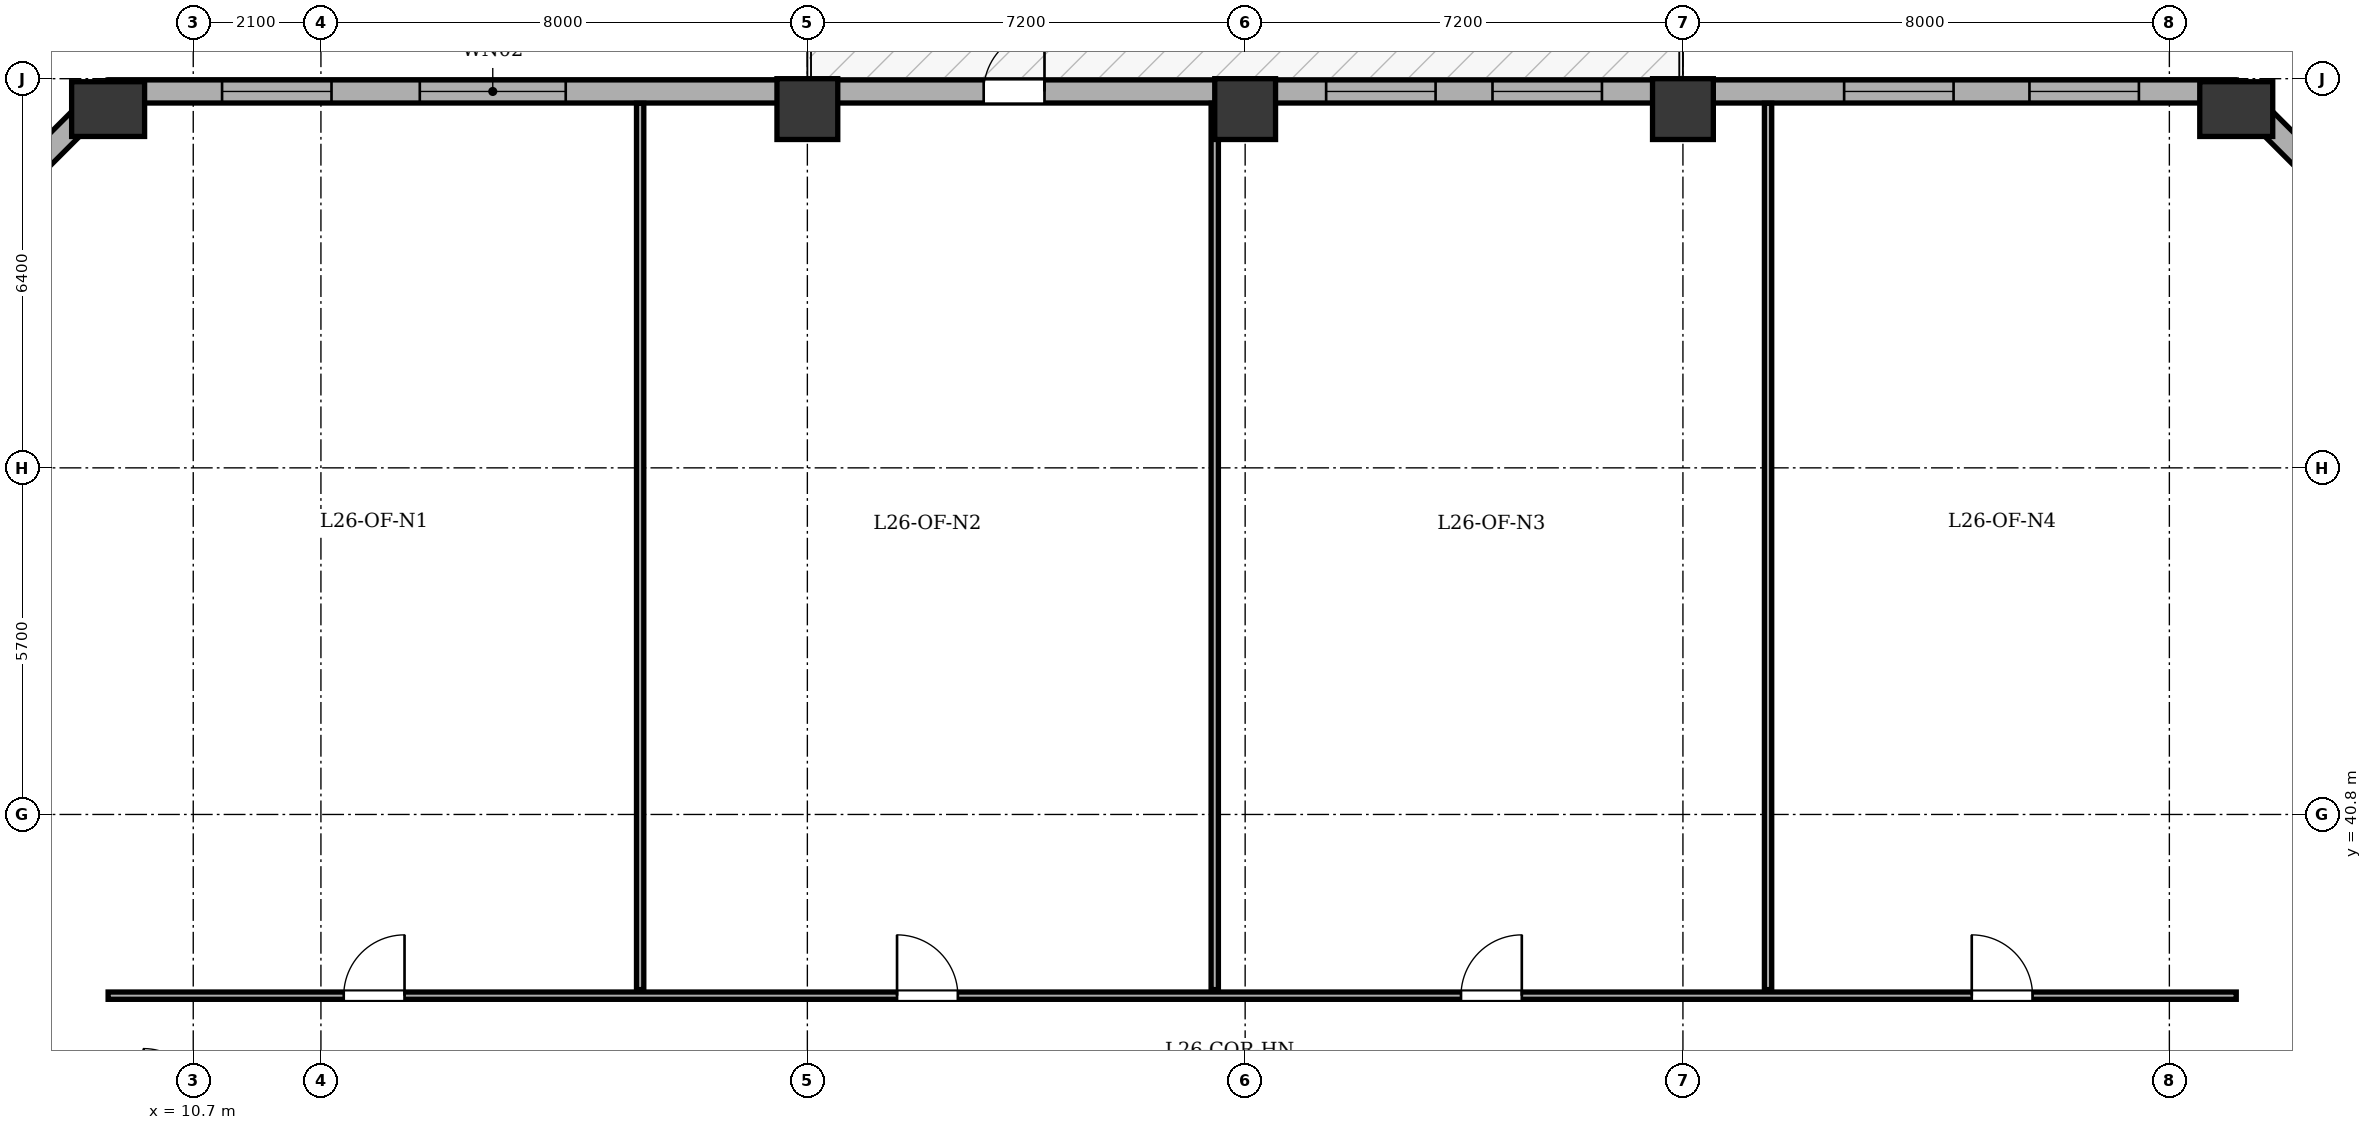
"""IFC4 building model, lengths in metres.
Left out: names, types, materials, properties, quantities, classifications, styles, units other than length and angle.
Written with IfcOpenShell. Run it as: python <this file> out.ifc"""

import sys

from ifc_helpers import new_model, si_unit, direction, frame, frame_2d, origin, origin_2d, place, context, subcontext, project, spatial, rectangle, extrude, element, fill, save


model = new_model("IFC4")
c1 = context("Model", 3, precision=1e-05, world=origin(), true_north=direction((0.0, 1.0)))
c2 = subcontext(c1, "Body", "Model", "MODEL_VIEW")
j1 = project(units=[si_unit("LENGTHUNIT", "METRE"), si_unit("PLANEANGLEUNIT", "RADIAN")], contexts=[c1])
p1 = place(None, origin())
s1 = spatial("IfcSite", under=j1, at=p1, CompositionType="ELEMENT")
p2 = place(p1, origin())
s2 = spatial("IfcBuilding", under=s1, at=p2, CompositionType="ELEMENT")
p3 = place(p2, frame((0.0, 0.0, 106.2)))
s3 = spatial("IfcBuildingStorey", under=s2, at=p3, CompositionType="ELEMENT", Elevation=106.2)
p4 = place(p3, frame((9.3, 52.4, 0.0), z_axis=(0.0, 0.0, 1.0), x_axis=(1.0, 0.0, 0.0)))
e1 = element("IfcColumn", 1, at=p4, inside=s3, PredefinedType="COLUMN", context=c2, shape_type="SweptSolid", body=[
    extrude(rectangle(XDim=0.9, YDim=1.2, at=origin_2d()), origin(), (0.0, 0.0, 1.0), 3.9),
])
for number, where, z_axis, x_axis in (
    (2, (20.8, 52.4, 0.0), (0.0, 0.0, 1.0), (1.0, 0.0, 0.0)),
    (3, (28.0, 52.4, 0.0), (0.0, 0.0, 1.0), (1.0, 0.0, 0.0)),
    (4, (35.2, 52.4, 0.0), (0.0, 0.0, 1.0), (1.0, 0.0, 0.0)),
):
    element("IfcColumn", number, at=place(p3, frame(where, z_axis=z_axis, x_axis=x_axis)), inside=s3, PredefinedType="COLUMN", context=c2, shape_type="SweptSolid", body=[
        extrude(rectangle(XDim=1.0, YDim=1.0, at=origin_2d()), origin(), (0.0, 0.0, 1.0), 3.9),
    ])
p5 = place(p3, frame((44.3, 52.4, 0.0), z_axis=(0.0, 0.0, 1.0), x_axis=(1.0, 0.0, 0.0)))
e5 = element("IfcColumn", 5, at=p5, inside=s3, PredefinedType="COLUMN", context=c2, shape_type="SweptSolid", body=[
    extrude(rectangle(XDim=0.9, YDim=1.2, at=origin_2d()), origin(), (0.0, 0.0, 1.0), 3.9),
])
p6 = place(p3, frame((4.51, 47.9, 0.0), z_axis=(0.0, 0.0, 1.0), x_axis=(0.707106781187, 0.707106781187, 0.0)))
e6 = element("IfcWall", 6, at=p6, inside=s3, PredefinedType="STANDARD", context=c2, shape_type="SweptSolid", body=[
    extrude(rectangle(XDim=6.774, YDim=0.38, at=frame_2d((3.387, 0.0))), origin(), (0.0, 0.0, 1.0), 2.985),
])
p7 = place(p6, frame((2.687, 0.0, 0.8)))
e7 = element("IfcOpeningElement", 7, at=p7, cuts=e6, PredefinedType="OPENING", context=c2, shape_type="SweptSolid", body=[
    extrude(rectangle(XDim=1.4, YDim=1.65, at=frame_2d((0.7, 0.825))), frame((0.0, 0.2, 0.0), z_axis=(0.0, -1.0, 0.0), x_axis=(1.0, 0.0, 0.0)), (0.0, 0.0, 1.0), 0.4),
])
p8 = place(p3, frame((9.3, 52.69, 0.0), z_axis=(0.0, 0.0, 1.0), x_axis=(1.0, 0.0, 0.0)))
e8 = element("IfcWall", 8, at=p8, inside=s3, PredefinedType="STANDARD", context=c2, shape_type="SweptSolid", body=[
    extrude(rectangle(XDim=35.0, YDim=0.38, at=frame_2d((17.5, 0.0))), origin(), (0.0, 0.0, 1.0), 2.985),
])
p9 = place(p8, frame((14.4, 0.0, 0.0)))
e9 = element("IfcOpeningElement", 9, at=p9, cuts=e8, PredefinedType="OPENING", context=c2, shape_type="SweptSolid", body=[
    extrude(rectangle(XDim=1.0, YDim=2.02, at=frame_2d((0.5, 1.01))), frame((0.0, 0.2, 0.0), z_axis=(0.0, -1.0, 0.0), x_axis=(1.0, 0.0, 0.0)), (0.0, 0.0, 1.0), 0.4),
])
p10 = place(p8, frame((1.874, 0.0, 0.8)))
e10 = element("IfcOpeningElement", 10, at=p10, cuts=e8, PredefinedType="OPENING", context=c2, shape_type="SweptSolid", body=[
    extrude(rectangle(XDim=1.8, YDim=1.9, at=frame_2d((0.9, 0.95))), frame((0.0, 0.2, 0.0), z_axis=(0.0, -1.0, 0.0), x_axis=(1.0, 0.0, 0.0)), (0.0, 0.0, 1.0), 0.4),
])
p11 = place(p8, frame((5.126, 0.0, 0.8)))
e11 = element("IfcOpeningElement", 11, at=p11, cuts=e8, PredefinedType="OPENING", context=c2, shape_type="SweptSolid", body=[
    extrude(rectangle(XDim=2.4, YDim=1.9, at=frame_2d((1.2, 0.95))), frame((0.0, 0.2, 0.0), z_axis=(0.0, -1.0, 0.0), x_axis=(1.0, 0.0, 0.0)), (0.0, 0.0, 1.0), 0.4),
])
p12 = place(p8, frame((20.032, 0.0, 0.8)))
e12 = element("IfcOpeningElement", 12, at=p12, cuts=e8, PredefinedType="OPENING", context=c2, shape_type="SweptSolid", body=[
    extrude(rectangle(XDim=1.8, YDim=1.9, at=frame_2d((0.9, 0.95))), frame((0.0, 0.2, 0.0), z_axis=(0.0, -1.0, 0.0), x_axis=(1.0, 0.0, 0.0)), (0.0, 0.0, 1.0), 0.4),
])
p13 = place(p8, frame((22.768, 0.0, 0.8)))
e13 = element("IfcOpeningElement", 13, at=p13, cuts=e8, PredefinedType="OPENING", context=c2, shape_type="SweptSolid", body=[
    extrude(rectangle(XDim=1.8, YDim=1.9, at=frame_2d((0.9, 0.95))), frame((0.0, 0.2, 0.0), z_axis=(0.0, -1.0, 0.0), x_axis=(1.0, 0.0, 0.0)), (0.0, 0.0, 1.0), 0.4),
])
p14 = place(p8, frame((28.551, 0.0, 0.8)))
e14 = element("IfcOpeningElement", 14, at=p14, cuts=e8, PredefinedType="OPENING", context=c2, shape_type="SweptSolid", body=[
    extrude(rectangle(XDim=1.8, YDim=1.9, at=frame_2d((0.9, 0.95))), frame((0.0, 0.2, 0.0), z_axis=(0.0, -1.0, 0.0), x_axis=(1.0, 0.0, 0.0)), (0.0, 0.0, 1.0), 0.4),
])
p15 = place(p8, frame((31.599, 0.0, 0.8)))
e15 = element("IfcOpeningElement", 15, at=p15, cuts=e8, PredefinedType="OPENING", context=c2, shape_type="SweptSolid", body=[
    extrude(rectangle(XDim=1.8, YDim=1.9, at=frame_2d((0.9, 0.95))), frame((0.0, 0.2, 0.0), z_axis=(0.0, -1.0, 0.0), x_axis=(1.0, 0.0, 0.0)), (0.0, 0.0, 1.0), 0.4),
])
p16 = place(p3, frame((44.3, 52.69, 0.0), z_axis=(0.0, 0.0, 1.0), x_axis=(0.707106781187, -0.707106781187, 0.0)))
e16 = element("IfcWall", 16, at=p16, inside=s3, PredefinedType="STANDARD", context=c2, shape_type="SweptSolid", body=[
    extrude(rectangle(XDim=6.774, YDim=0.38, at=frame_2d((3.387, 0.0))), origin(), (0.0, 0.0, 1.0), 2.985),
])
p17 = place(p16, frame((2.687, 0.0, 0.8)))
e17 = element("IfcOpeningElement", 17, at=p17, cuts=e16, PredefinedType="OPENING", context=c2, shape_type="SweptSolid", body=[
    extrude(rectangle(XDim=1.4, YDim=1.65, at=frame_2d((0.7, 0.825))), frame((0.0, 0.2, 0.0), z_axis=(0.0, -1.0, 0.0), x_axis=(1.0, 0.0, 0.0)), (0.0, 0.0, 1.0), 0.4),
])
p18 = place(p3, frame((9.3, 37.82, 0.0), z_axis=(0.0, 0.0, 1.0), x_axis=(1.0, 0.0, 0.0)))
e18 = element("IfcWall", 18, at=p18, inside=s3, PredefinedType="PARTITIONING", context=c2, shape_type="SweptSolid", body=[
    extrude(rectangle(XDim=35.0, YDim=0.12, at=frame_2d((17.5, 0.0))), origin(), (0.0, 0.0, 1.0), 3.45),
])
p19 = place(p18, frame((3.875, 0.0, 0.0)))
e19 = element("IfcOpeningElement", 19, at=p19, cuts=e18, PredefinedType="OPENING", context=c2, shape_type="SweptSolid", body=[
    extrude(rectangle(XDim=1.0, YDim=2.1, at=frame_2d((0.5, 1.05))), frame((0.0, 0.07, 0.0), z_axis=(0.0, -1.0, 0.0), x_axis=(1.0, 0.0, 0.0)), (0.0, 0.0, 1.0), 0.14),
])
p20 = place(p18, frame((12.975, 0.0, 0.0)))
e20 = element("IfcOpeningElement", 20, at=p20, cuts=e18, PredefinedType="OPENING", context=c2, shape_type="SweptSolid", body=[
    extrude(rectangle(XDim=1.0, YDim=2.1, at=frame_2d((0.5, 1.05))), frame((0.0, 0.07, 0.0), z_axis=(0.0, -1.0, 0.0), x_axis=(1.0, 0.0, 0.0)), (0.0, 0.0, 1.0), 0.14),
])
p21 = place(p18, frame((22.25, 0.0, 0.0)))
e21 = element("IfcOpeningElement", 21, at=p21, cuts=e18, PredefinedType="OPENING", context=c2, shape_type="SweptSolid", body=[
    extrude(rectangle(XDim=1.0, YDim=2.1, at=frame_2d((0.5, 1.05))), frame((0.0, 0.07, 0.0), z_axis=(0.0, -1.0, 0.0), x_axis=(1.0, 0.0, 0.0)), (0.0, 0.0, 1.0), 0.14),
])
p22 = place(p18, frame((30.65, 0.0, 0.0)))
e22 = element("IfcOpeningElement", 22, at=p22, cuts=e18, PredefinedType="OPENING", context=c2, shape_type="SweptSolid", body=[
    extrude(rectangle(XDim=1.0, YDim=2.1, at=frame_2d((0.5, 1.05))), frame((0.0, 0.07, 0.0), z_axis=(0.0, -1.0, 0.0), x_axis=(1.0, 0.0, 0.0)), (0.0, 0.0, 1.0), 0.14),
])
for number, where, z_axis, x_axis in (
    (23, (18.05, 37.92, 0.0), (0.0, 0.0, 1.0), (0.0, 1.0, 0.0)),
    (24, (27.5, 37.92, 0.0), (0.0, 0.0, 1.0), (0.0, 1.0, 0.0)),
    (25, (36.6, 37.92, 0.0), (0.0, 0.0, 1.0), (0.0, 1.0, 0.0)),
):
    element("IfcWall", number, at=place(p3, frame(where, z_axis=z_axis, x_axis=x_axis)), inside=s3, PredefinedType="PARTITIONING", context=c2, shape_type="SweptSolid", body=[
        extrude(rectangle(XDim=14.575, YDim=0.12, at=frame_2d((7.288, 0.0))), origin(), (0.0, 0.0, 1.0), 3.45),
    ])
p23 = place(p9, origin())
e26 = element("IfcDoor", 26, at=p23, inside=s3, OperationType="SINGLE_SWING_RIGHT", PredefinedType="DOOR", context=c2, shape_type="SweptSolid", body=[
    extrude(rectangle(XDim=1.0, YDim=2.02, at=frame_2d((0.5, 1.01))), frame((0.0, 0.025, 0.0), z_axis=(0.0, -1.0, 0.0), x_axis=(1.0, 0.0, 0.0)), (0.0, 0.0, 1.0), 0.05),
])
fill(e9, e26)
p24 = place(p10, origin())
e27 = element("IfcWindow", 27, at=p24, inside=s3, PartitioningType="SINGLE_PANEL", PredefinedType="WINDOW", context=c2, shape_type="SweptSolid", body=[
    extrude(rectangle(XDim=1.8, YDim=1.9, at=frame_2d((0.9, 0.95))), frame((0.0, -0.01, 0.0), z_axis=(0.0, -1.0, 0.0), x_axis=(1.0, 0.0, 0.0)), (0.0, 0.0, 1.0), 0.06),
])
fill(e10, e27)
p25 = place(p11, origin())
e28 = element("IfcWindow", 28, at=p25, inside=s3, PartitioningType="SINGLE_PANEL", PredefinedType="WINDOW", context=c2, shape_type="SweptSolid", body=[
    extrude(rectangle(XDim=2.4, YDim=1.9, at=frame_2d((1.2, 0.95))), frame((0.0, -0.01, 0.0), z_axis=(0.0, -1.0, 0.0), x_axis=(1.0, 0.0, 0.0)), (0.0, 0.0, 1.0), 0.06),
])
fill(e11, e28)
p26 = place(p12, origin())
e29 = element("IfcWindow", 29, at=p26, inside=s3, PartitioningType="SINGLE_PANEL", PredefinedType="WINDOW", context=c2, shape_type="SweptSolid", body=[
    extrude(rectangle(XDim=1.8, YDim=1.9, at=frame_2d((0.9, 0.95))), frame((0.0, -0.01, 0.0), z_axis=(0.0, -1.0, 0.0), x_axis=(1.0, 0.0, 0.0)), (0.0, 0.0, 1.0), 0.06),
])
fill(e12, e29)
p27 = place(p13, origin())
e30 = element("IfcWindow", 30, at=p27, inside=s3, PartitioningType="SINGLE_PANEL", PredefinedType="WINDOW", context=c2, shape_type="SweptSolid", body=[
    extrude(rectangle(XDim=1.8, YDim=1.9, at=frame_2d((0.9, 0.95))), frame((0.0, -0.01, 0.0), z_axis=(0.0, -1.0, 0.0), x_axis=(1.0, 0.0, 0.0)), (0.0, 0.0, 1.0), 0.06),
])
fill(e13, e30)
p28 = place(p14, origin())
e31 = element("IfcWindow", 31, at=p28, inside=s3, PartitioningType="SINGLE_PANEL", PredefinedType="WINDOW", context=c2, shape_type="SweptSolid", body=[
    extrude(rectangle(XDim=1.8, YDim=1.9, at=frame_2d((0.9, 0.95))), frame((0.0, -0.01, 0.0), z_axis=(0.0, -1.0, 0.0), x_axis=(1.0, 0.0, 0.0)), (0.0, 0.0, 1.0), 0.06),
])
fill(e14, e31)
p29 = place(p15, origin())
e32 = element("IfcWindow", 32, at=p29, inside=s3, PartitioningType="SINGLE_PANEL", PredefinedType="WINDOW", context=c2, shape_type="SweptSolid", body=[
    extrude(rectangle(XDim=1.8, YDim=1.9, at=frame_2d((0.9, 0.95))), frame((0.0, -0.01, 0.0), z_axis=(0.0, -1.0, 0.0), x_axis=(1.0, 0.0, 0.0)), (0.0, 0.0, 1.0), 0.06),
])
fill(e15, e32)
p30 = place(p19, origin())
e33 = element("IfcDoor", 33, at=p30, inside=s3, OperationType="SINGLE_SWING_RIGHT", PredefinedType="DOOR", context=c2, shape_type="SweptSolid", body=[
    extrude(rectangle(XDim=1.0, YDim=2.1, at=frame_2d((0.5, 1.05))), frame((0.0, 0.025, 0.0), z_axis=(0.0, -1.0, 0.0), x_axis=(1.0, 0.0, 0.0)), (0.0, 0.0, 1.0), 0.05),
])
fill(e19, e33)
p31 = place(p20, origin())
e34 = element("IfcDoor", 34, at=p31, inside=s3, OperationType="SINGLE_SWING_LEFT", PredefinedType="DOOR", context=c2, shape_type="SweptSolid", body=[
    extrude(rectangle(XDim=1.0, YDim=2.1, at=frame_2d((0.5, 1.05))), frame((0.0, 0.025, 0.0), z_axis=(0.0, -1.0, 0.0), x_axis=(1.0, 0.0, 0.0)), (0.0, 0.0, 1.0), 0.05),
])
fill(e20, e34)
p32 = place(p21, origin())
e35 = element("IfcDoor", 35, at=p32, inside=s3, OperationType="SINGLE_SWING_RIGHT", PredefinedType="DOOR", context=c2, shape_type="SweptSolid", body=[
    extrude(rectangle(XDim=1.0, YDim=2.1, at=frame_2d((0.5, 1.05))), frame((0.0, 0.025, 0.0), z_axis=(0.0, -1.0, 0.0), x_axis=(1.0, 0.0, 0.0)), (0.0, 0.0, 1.0), 0.05),
])
fill(e21, e35)
p33 = place(p22, origin())
e36 = element("IfcDoor", 36, at=p33, inside=s3, OperationType="SINGLE_SWING_LEFT", PredefinedType="DOOR", context=c2, shape_type="SweptSolid", body=[
    extrude(rectangle(XDim=1.0, YDim=2.1, at=frame_2d((0.5, 1.05))), frame((0.0, 0.025, 0.0), z_axis=(0.0, -1.0, 0.0), x_axis=(1.0, 0.0, 0.0)), (0.0, 0.0, 1.0), 0.05),
])
fill(e22, e36)
save(model, sys.argv[1])
